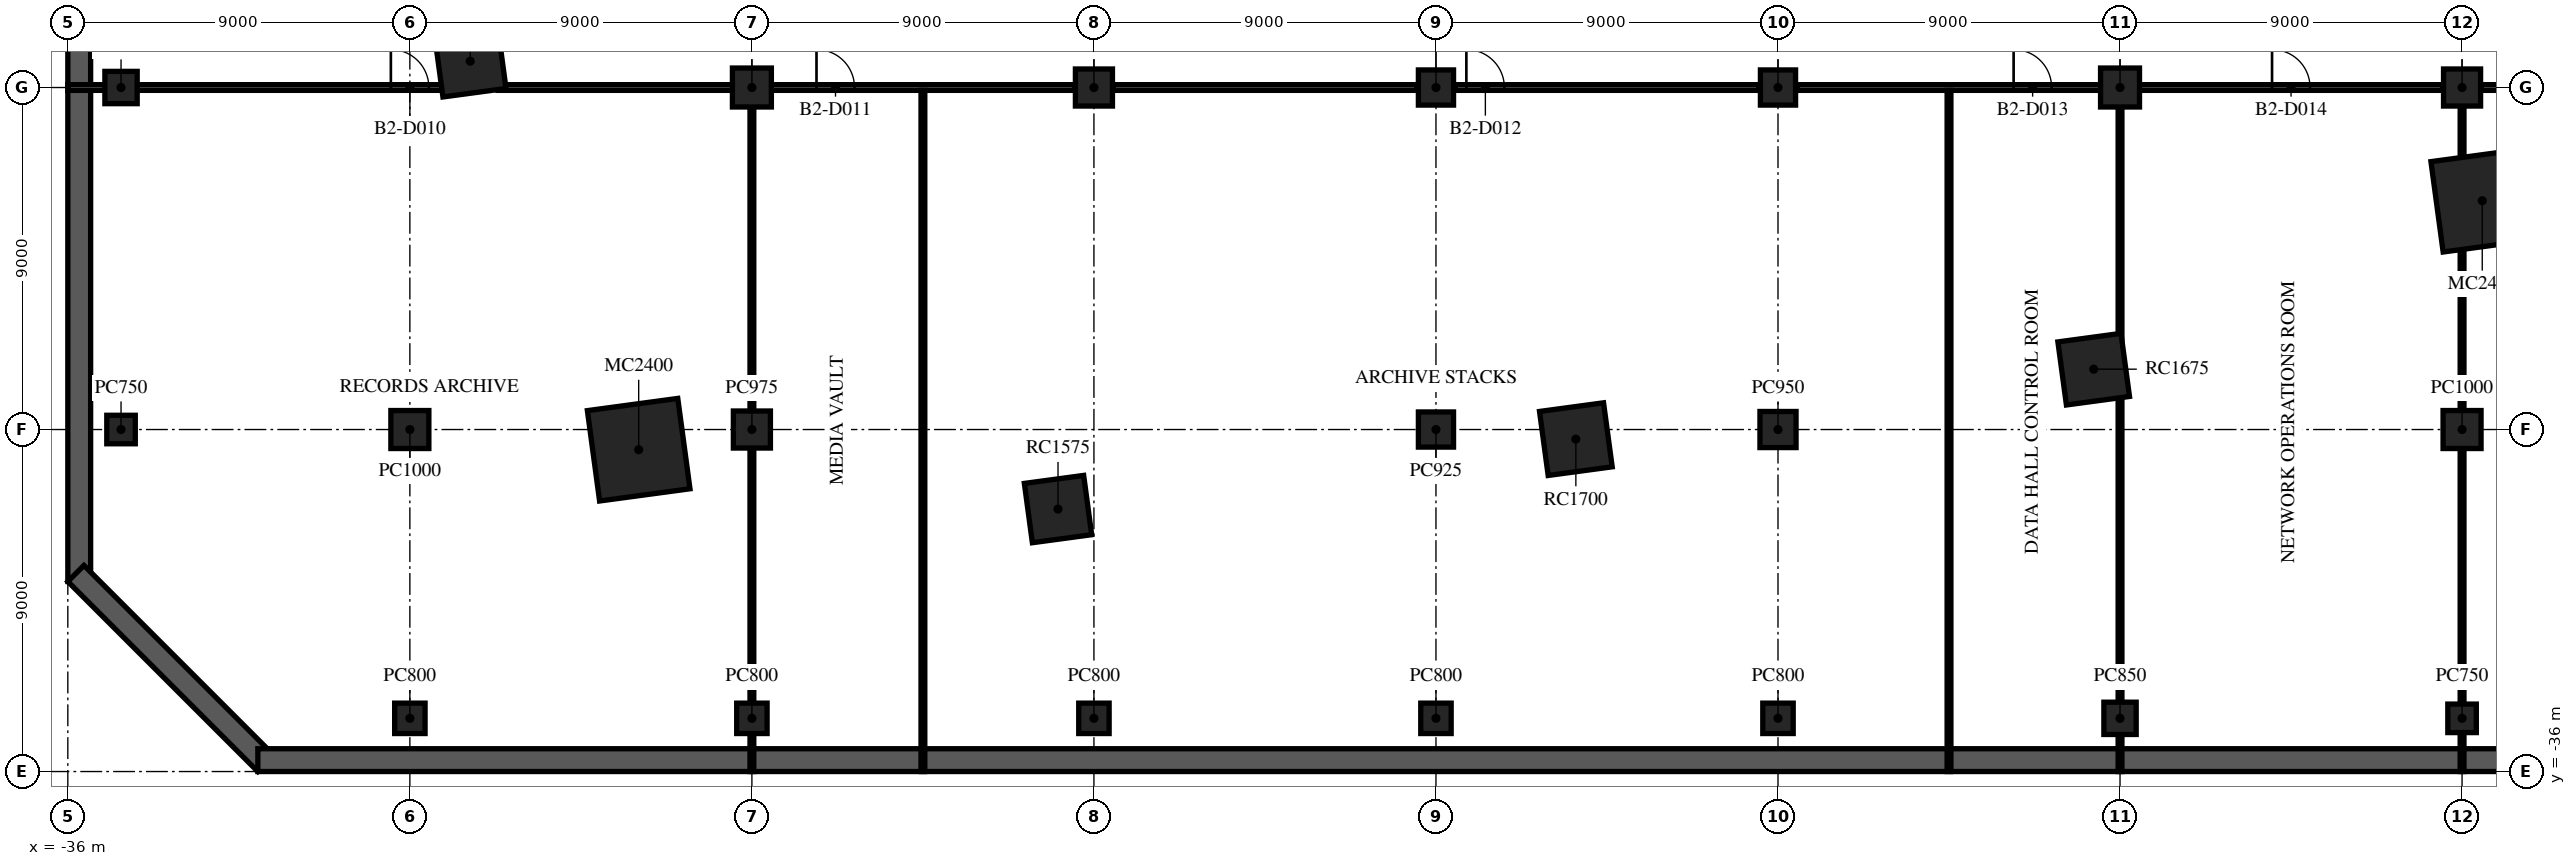
"""IFC4 building model, lengths in metres.
Left out: names, types, materials, properties, quantities, classifications, styles, units other than length and angle.
Written with IfcOpenShell. Run it as: python <this file> out.ifc"""

import sys

from ifc_helpers import new_model, si_unit, direction, frame, frame_2d, origin, origin_2d, place, context, subcontext, project, spatial, rectangle, extrude, element, fill, save


model = new_model("IFC4")
c1 = context("Model", 3, precision=1e-05, world=origin(), true_north=direction((0.0, 1.0)))
c2 = subcontext(c1, "Body", "Model", "MODEL_VIEW")
j1 = project(units=[si_unit("LENGTHUNIT", "METRE"), si_unit("PLANEANGLEUNIT", "RADIAN")], contexts=[c1])
p1 = place(None, origin())
s1 = spatial("IfcSite", under=j1, at=p1, CompositionType="ELEMENT")
p2 = place(p1, origin())
s2 = spatial("IfcBuilding", under=s1, at=p2, CompositionType="ELEMENT")
p3 = place(p2, frame((0.0, 0.0, -9.0)))
s3 = spatial("IfcBuildingStorey", under=s2, at=p3, CompositionType="ELEMENT", Elevation=-9.0)
p4 = place(p3, frame((-35.7, 31.0, -0.3), z_axis=(0.0, 0.0, 1.0), x_axis=(0.0, -1.0, 0.0)))
e1 = element("IfcWall", 1, at=p4, inside=s3, PredefinedType="SOLIDWALL", context=c2, shape_type="SweptSolid", body=[
    extrude(rectangle(XDim=62.0, YDim=0.6, at=frame_2d((31.0, 0.0))), origin(), (0.0, 0.0, 1.0), 4.5),
])
p5 = place(p3, frame((-35.788, -30.788, -0.3), z_axis=(0.0, 0.0, 1.0), x_axis=(0.707106781187, -0.707106781187, 0.0)))
e2 = element("IfcWall", 2, at=p5, inside=s3, PredefinedType="SOLIDWALL", context=c2, shape_type="SweptSolid", body=[
    extrude(rectangle(XDim=7.071, YDim=0.6, at=frame_2d((3.536, 0.0))), origin(), (0.0, 0.0, 1.0), 4.5),
])
p6 = place(p3, frame((-31.0, -35.7, -0.3), z_axis=(0.0, 0.0, 1.0), x_axis=(1.0, 0.0, 0.0)))
e3 = element("IfcWall", 3, at=p6, inside=s3, PredefinedType="SOLIDWALL", context=c2, shape_type="SweptSolid", body=[
    extrude(rectangle(XDim=62.0, YDim=0.6, at=frame_2d((31.0, 0.0))), origin(), (0.0, 0.0, 1.0), 4.5),
])
p7 = place(p3, frame((-34.6, -27.0, -0.3), z_axis=(0.0, 0.0, 1.0), x_axis=(1.0, 0.0, 0.0)))
e4 = element("IfcColumn", 4, at=p7, inside=s3, PredefinedType="COLUMN", context=c2, shape_type="SweptSolid", body=[
    extrude(rectangle(XDim=0.75, YDim=0.75, at=origin_2d()), origin(), (0.0, 0.0, 1.0), 4.8),
])
p8 = place(p3, frame((-34.6, -18.0, -0.3), z_axis=(0.0, 0.0, 1.0), x_axis=(1.0, 0.0, 0.0)))
e5 = element("IfcColumn", 5, at=p8, inside=s3, PredefinedType="COLUMN", context=c2, shape_type="SweptSolid", body=[
    extrude(rectangle(XDim=0.85, YDim=0.85, at=origin_2d()), origin(), (0.0, 0.0, 1.0), 4.8),
])
p9 = place(p3, frame((-27.0, -34.6, -0.3), z_axis=(0.0, 0.0, 1.0), x_axis=(1.0, 0.0, 0.0)))
e6 = element("IfcColumn", 6, at=p9, inside=s3, PredefinedType="COLUMN", context=c2, shape_type="SweptSolid", body=[
    extrude(rectangle(XDim=0.8, YDim=0.8, at=origin_2d()), origin(), (0.0, 0.0, 1.0), 4.8),
])
p10 = place(p3, frame((-27.0, -27.0, -0.3), z_axis=(0.0, 0.0, 1.0), x_axis=(1.0, 0.0, 0.0)))
e7 = element("IfcColumn", 7, at=p10, inside=s3, PredefinedType="COLUMN", context=c2, shape_type="SweptSolid", body=[
    extrude(rectangle(XDim=1.0, YDim=1.0, at=origin_2d()), origin(), (0.0, 0.0, 1.0), 4.8),
])
p11 = place(p3, frame((-18.0, -34.6, -0.3), z_axis=(0.0, 0.0, 1.0), x_axis=(1.0, 0.0, 0.0)))
e8 = element("IfcColumn", 8, at=p11, inside=s3, PredefinedType="COLUMN", context=c2, shape_type="SweptSolid", body=[
    extrude(rectangle(XDim=0.8, YDim=0.8, at=origin_2d()), origin(), (0.0, 0.0, 1.0), 4.8),
])
p12 = place(p3, frame((-18.0, -27.0, -0.3), z_axis=(0.0, 0.0, 1.0), x_axis=(1.0, 0.0, 0.0)))
e9 = element("IfcColumn", 9, at=p12, inside=s3, PredefinedType="COLUMN", context=c2, shape_type="SweptSolid", body=[
    extrude(rectangle(XDim=0.975, YDim=0.975, at=origin_2d()), origin(), (0.0, 0.0, 1.0), 4.8),
])
p13 = place(p3, frame((-18.0, -18.0, -0.3), z_axis=(0.0, 0.0, 1.0), x_axis=(1.0, 0.0, 0.0)))
e10 = element("IfcColumn", 10, at=p13, inside=s3, PredefinedType="COLUMN", context=c2, shape_type="SweptSolid", body=[
    extrude(rectangle(XDim=1.025, YDim=1.025, at=origin_2d()), origin(), (0.0, 0.0, 1.0), 4.8),
])
p14 = place(p3, frame((-9.0, -34.6, -0.3), z_axis=(0.0, 0.0, 1.0), x_axis=(1.0, 0.0, 0.0)))
e11 = element("IfcColumn", 11, at=p14, inside=s3, PredefinedType="COLUMN", context=c2, shape_type="SweptSolid", body=[
    extrude(rectangle(XDim=0.8, YDim=0.8, at=origin_2d()), origin(), (0.0, 0.0, 1.0), 4.8),
])
p15 = place(p3, frame((-9.0, -18.0, -0.3), z_axis=(0.0, 0.0, 1.0), x_axis=(1.0, 0.0, 0.0)))
e12 = element("IfcColumn", 12, at=p15, inside=s3, PredefinedType="COLUMN", context=c2, shape_type="SweptSolid", body=[
    extrude(rectangle(XDim=0.975, YDim=0.975, at=origin_2d()), origin(), (0.0, 0.0, 1.0), 4.8),
])
p16 = place(p3, frame((0.0, -34.6, -0.3), z_axis=(0.0, 0.0, 1.0), x_axis=(1.0, 0.0, 0.0)))
e13 = element("IfcColumn", 13, at=p16, inside=s3, PredefinedType="COLUMN", context=c2, shape_type="SweptSolid", body=[
    extrude(rectangle(XDim=0.8, YDim=0.8, at=origin_2d()), origin(), (0.0, 0.0, 1.0), 4.8),
])
for number, where, z_axis, x_axis in (
    (14, (0.0, -27.0, -0.3), (0.0, 0.0, 1.0), (1.0, 0.0, 0.0)),
    (15, (0.0, -18.0, -0.3), (0.0, 0.0, 1.0), (1.0, 0.0, 0.0)),
):
    element("IfcColumn", number, at=place(p3, frame(where, z_axis=z_axis, x_axis=x_axis)), inside=s3, PredefinedType="COLUMN", context=c2, shape_type="SweptSolid", body=[
        extrude(rectangle(XDim=0.925, YDim=0.925, at=origin_2d()), origin(), (0.0, 0.0, 1.0), 4.8),
    ])
p17 = place(p3, frame((9.0, -34.6, -0.3), z_axis=(0.0, 0.0, 1.0), x_axis=(1.0, 0.0, 0.0)))
e16 = element("IfcColumn", 16, at=p17, inside=s3, PredefinedType="COLUMN", context=c2, shape_type="SweptSolid", body=[
    extrude(rectangle(XDim=0.8, YDim=0.8, at=origin_2d()), origin(), (0.0, 0.0, 1.0), 4.8),
])
p18 = place(p3, frame((9.0, -27.0, -0.3), z_axis=(0.0, 0.0, 1.0), x_axis=(1.0, 0.0, 0.0)))
e17 = element("IfcColumn", 17, at=p18, inside=s3, PredefinedType="COLUMN", context=c2, shape_type="SweptSolid", body=[
    extrude(rectangle(XDim=0.95, YDim=0.95, at=origin_2d()), origin(), (0.0, 0.0, 1.0), 4.8),
])
p19 = place(p3, frame((9.0, -18.0, -0.3), z_axis=(0.0, 0.0, 1.0), x_axis=(1.0, 0.0, 0.0)))
e18 = element("IfcColumn", 18, at=p19, inside=s3, PredefinedType="COLUMN", context=c2, shape_type="SweptSolid", body=[
    extrude(rectangle(XDim=0.925, YDim=0.925, at=origin_2d()), origin(), (0.0, 0.0, 1.0), 4.8),
])
p20 = place(p3, frame((18.0, -34.6, -0.3), z_axis=(0.0, 0.0, 1.0), x_axis=(1.0, 0.0, 0.0)))
e19 = element("IfcColumn", 19, at=p20, inside=s3, PredefinedType="COLUMN", context=c2, shape_type="SweptSolid", body=[
    extrude(rectangle(XDim=0.85, YDim=0.85, at=origin_2d()), origin(), (0.0, 0.0, 1.0), 4.8),
])
p21 = place(p3, frame((18.0, -18.0, -0.3), z_axis=(0.0, 0.0, 1.0), x_axis=(1.0, 0.0, 0.0)))
e20 = element("IfcColumn", 20, at=p21, inside=s3, PredefinedType="COLUMN", context=c2, shape_type="SweptSolid", body=[
    extrude(rectangle(XDim=1.025, YDim=1.025, at=origin_2d()), origin(), (0.0, 0.0, 1.0), 4.8),
])
p22 = place(p3, frame((27.0, -34.6, -0.3), z_axis=(0.0, 0.0, 1.0), x_axis=(1.0, 0.0, 0.0)))
e21 = element("IfcColumn", 21, at=p22, inside=s3, PredefinedType="COLUMN", context=c2, shape_type="SweptSolid", body=[
    extrude(rectangle(XDim=0.75, YDim=0.75, at=origin_2d()), origin(), (0.0, 0.0, 1.0), 4.8),
])
p23 = place(p3, frame((27.0, -27.0, -0.3), z_axis=(0.0, 0.0, 1.0), x_axis=(1.0, 0.0, 0.0)))
e22 = element("IfcColumn", 22, at=p23, inside=s3, PredefinedType="COLUMN", context=c2, shape_type="SweptSolid", body=[
    extrude(rectangle(XDim=1.0, YDim=1.0, at=origin_2d()), origin(), (0.0, 0.0, 1.0), 4.8),
])
p24 = place(p3, frame((27.0, -18.0, -0.3), z_axis=(0.0, 0.0, 1.0), x_axis=(1.0, 0.0, 0.0)))
e23 = element("IfcColumn", 23, at=p24, inside=s3, PredefinedType="COLUMN", context=c2, shape_type="SweptSolid", body=[
    extrude(rectangle(XDim=0.975, YDim=0.975, at=origin_2d()), origin(), (0.0, 0.0, 1.0), 4.8),
])
p25 = place(p3, frame((-25.412, -17.307, -0.3), z_axis=(0.0, 0.0, 1.0), x_axis=(0.991001197216, 0.133853005627, 0.0)))
e24 = element("IfcColumn", 24, at=p25, inside=s3, PredefinedType="COLUMN", context=c2, shape_type="SweptSolid", body=[
    extrude(rectangle(XDim=1.675, YDim=1.675, at=origin_2d()), origin(), (0.0, 0.0, 1.0), 4.8),
])
p26 = place(p3, frame((-20.979, -27.531, -0.3), z_axis=(0.0, 0.0, 1.0), x_axis=(0.991001197216, 0.133853005627, 0.0)))
e25 = element("IfcColumn", 25, at=p26, inside=s3, PredefinedType="COLUMN", context=c2, shape_type="SweptSolid", body=[
    extrude(rectangle(XDim=2.4, YDim=2.4, at=origin_2d()), origin(), (0.0, 0.0, 1.0), 4.8),
])
p27 = place(p3, frame((-9.945, -29.093, -0.3), z_axis=(0.0, 0.0, 1.0), x_axis=(0.991001197216, 0.133853005627, 0.0)))
e26 = element("IfcColumn", 26, at=p27, inside=s3, PredefinedType="COLUMN", context=c2, shape_type="SweptSolid", body=[
    extrude(rectangle(XDim=1.575, YDim=1.575, at=origin_2d()), origin(), (0.0, 0.0, 1.0), 4.8),
])
p28 = place(p3, frame((3.681, -27.253, -0.3), z_axis=(0.0, 0.0, 1.0), x_axis=(0.991001197216, 0.133853005627, 0.0)))
e27 = element("IfcColumn", 27, at=p28, inside=s3, PredefinedType="COLUMN", context=c2, shape_type="SweptSolid", body=[
    extrude(rectangle(XDim=1.7, YDim=1.7, at=origin_2d()), origin(), (0.0, 0.0, 1.0), 4.8),
])
p29 = place(p3, frame((17.307, -25.412, -0.3), z_axis=(0.0, 0.0, 1.0), x_axis=(0.991001197216, 0.133853005627, 0.0)))
e28 = element("IfcColumn", 28, at=p29, inside=s3, PredefinedType="COLUMN", context=c2, shape_type="SweptSolid", body=[
    extrude(rectangle(XDim=1.675, YDim=1.675, at=origin_2d()), origin(), (0.0, 0.0, 1.0), 4.8),
])
p30 = place(p3, frame((27.531, -20.979, -0.3), z_axis=(0.0, 0.0, 1.0), x_axis=(0.991001197216, 0.133853005627, 0.0)))
e29 = element("IfcColumn", 29, at=p30, inside=s3, PredefinedType="COLUMN", context=c2, shape_type="SweptSolid", body=[
    extrude(rectangle(XDim=2.4, YDim=2.4, at=origin_2d()), origin(), (0.0, 0.0, 1.0), 4.8),
])
p31 = place(p3, frame((-36.0, -18.0, 0.0), z_axis=(0.0, 0.0, 1.0), x_axis=(1.0, 0.0, 0.0)))
e30 = element("IfcWall", 30, at=p31, inside=s3, PredefinedType="PARTITIONING", context=c2, shape_type="SweptSolid", body=[
    extrude(rectangle(XDim=9.857, YDim=0.15, at=frame_2d((4.928, 0.0))), origin(), (0.0, 0.0, 1.0), 4.2),
])
p32 = place(p31, frame((8.5, 0.0, 0.0)))
e31 = element("IfcOpeningElement", 31, at=p32, cuts=e30, PredefinedType="OPENING", context=c2, shape_type="SweptSolid", body=[
    extrude(rectangle(XDim=1.0, YDim=2.1, at=frame_2d((0.5, 1.05))), frame((0.0, 0.085, 0.0), z_axis=(0.0, -1.0, 0.0), x_axis=(1.0, 0.0, 0.0)), (0.0, 0.0, 1.0), 0.17),
])
p33 = place(p3, frame((-24.681, -18.0, 0.0), z_axis=(0.0, 0.0, 1.0), x_axis=(1.0, 0.0, 0.0)))
e32 = element("IfcWall", 32, at=p33, inside=s3, PredefinedType="PARTITIONING", context=c2, shape_type="SweptSolid", body=[
    extrude(rectangle(XDim=6.181, YDim=0.15, at=frame_2d((3.09, 0.0))), origin(), (0.0, 0.0, 1.0), 4.2),
])
p34 = place(p3, frame((-17.5, -18.0, 0.0), z_axis=(0.0, 0.0, 1.0), x_axis=(1.0, 0.0, 0.0)))
e33 = element("IfcWall", 33, at=p34, inside=s3, PredefinedType="PARTITIONING", context=c2, shape_type="SweptSolid", body=[
    extrude(rectangle(XDim=8.0, YDim=0.15, at=frame_2d((4.0, 0.0))), origin(), (0.0, 0.0, 1.0), 4.2),
])
p35 = place(p34, frame((1.2, 0.0, 0.0)))
e34 = element("IfcOpeningElement", 34, at=p35, cuts=e33, PredefinedType="OPENING", context=c2, shape_type="SweptSolid", body=[
    extrude(rectangle(XDim=1.0, YDim=2.1, at=frame_2d((0.5, 1.05))), frame((0.0, 0.085, 0.0), z_axis=(0.0, -1.0, 0.0), x_axis=(1.0, 0.0, 0.0)), (0.0, 0.0, 1.0), 0.17),
])
p36 = place(p3, frame((-8.5, -18.0, 0.0), z_axis=(0.0, 0.0, 1.0), x_axis=(1.0, 0.0, 0.0)))
e35 = element("IfcWall", 35, at=p36, inside=s3, PredefinedType="PARTITIONING", context=c2, shape_type="SweptSolid", body=[
    extrude(rectangle(XDim=8.0, YDim=0.15, at=frame_2d((4.0, 0.0))), origin(), (0.0, 0.0, 1.0), 4.2),
])
p37 = place(p3, frame((0.5, -18.0, 0.0), z_axis=(0.0, 0.0, 1.0), x_axis=(1.0, 0.0, 0.0)))
e36 = element("IfcWall", 36, at=p37, inside=s3, PredefinedType="PARTITIONING", context=c2, shape_type="SweptSolid", body=[
    extrude(rectangle(XDim=8.0, YDim=0.15, at=frame_2d((4.0, 0.0))), origin(), (0.0, 0.0, 1.0), 4.2),
])
p38 = place(p37, frame((0.3, 0.0, 0.0)))
e37 = element("IfcOpeningElement", 37, at=p38, cuts=e36, PredefinedType="OPENING", context=c2, shape_type="SweptSolid", body=[
    extrude(rectangle(XDim=1.0, YDim=2.1, at=frame_2d((0.5, 1.05))), frame((0.0, 0.085, 0.0), z_axis=(0.0, -1.0, 0.0), x_axis=(1.0, 0.0, 0.0)), (0.0, 0.0, 1.0), 0.17),
])
p39 = place(p3, frame((9.5, -18.0, 0.0), z_axis=(0.0, 0.0, 1.0), x_axis=(1.0, 0.0, 0.0)))
e38 = element("IfcWall", 38, at=p39, inside=s3, PredefinedType="PARTITIONING", context=c2, shape_type="SweptSolid", body=[
    extrude(rectangle(XDim=8.0, YDim=0.15, at=frame_2d((4.0, 0.0))), origin(), (0.0, 0.0, 1.0), 4.2),
])
p40 = place(p39, frame((5.7, 0.0, 0.0)))
e39 = element("IfcOpeningElement", 39, at=p40, cuts=e38, PredefinedType="OPENING", context=c2, shape_type="SweptSolid", body=[
    extrude(rectangle(XDim=1.0, YDim=2.1, at=frame_2d((0.5, 1.05))), frame((0.0, 0.085, 0.0), z_axis=(0.0, -1.0, 0.0), x_axis=(1.0, 0.0, 0.0)), (0.0, 0.0, 1.0), 0.17),
])
p41 = place(p3, frame((18.5, -18.0, 0.0), z_axis=(0.0, 0.0, 1.0), x_axis=(1.0, 0.0, 0.0)))
e40 = element("IfcWall", 40, at=p41, inside=s3, PredefinedType="PARTITIONING", context=c2, shape_type="SweptSolid", body=[
    extrude(rectangle(XDim=8.0, YDim=0.15, at=frame_2d((4.0, 0.0))), origin(), (0.0, 0.0, 1.0), 4.2),
])
p42 = place(p41, frame((3.5, 0.0, 0.0)))
e41 = element("IfcOpeningElement", 41, at=p42, cuts=e40, PredefinedType="OPENING", context=c2, shape_type="SweptSolid", body=[
    extrude(rectangle(XDim=1.0, YDim=2.1, at=frame_2d((0.5, 1.05))), frame((0.0, 0.085, 0.0), z_axis=(0.0, -1.0, 0.0), x_axis=(1.0, 0.0, 0.0)), (0.0, 0.0, 1.0), 0.17),
])
p43 = place(p3, frame((27.5, -18.0, 0.0), z_axis=(0.0, 0.0, 1.0), x_axis=(1.0, 0.0, 0.0)))
e42 = element("IfcWall", 42, at=p43, inside=s3, PredefinedType="PARTITIONING", context=c2, shape_type="SweptSolid", body=[
    extrude(rectangle(XDim=8.5, YDim=0.15, at=frame_2d((4.25, 0.0))), origin(), (0.0, 0.0, 1.0), 4.2),
])
p44 = place(p43, frame((3.5, 0.0, 0.0)))
e43 = element("IfcOpeningElement", 43, at=p44, cuts=e42, PredefinedType="OPENING", context=c2, shape_type="SweptSolid", body=[
    extrude(rectangle(XDim=1.0, YDim=2.1, at=frame_2d((0.5, 1.05))), frame((0.0, 0.085, 0.0), z_axis=(0.0, -1.0, 0.0), x_axis=(1.0, 0.0, 0.0)), (0.0, 0.0, 1.0), 0.17),
])
p45 = place(p3, frame((-18.0, -36.0, 0.0), z_axis=(0.0, 0.0, 1.0), x_axis=(0.0, 1.0, 0.0)))
e44 = element("IfcWall", 44, at=p45, inside=s3, PredefinedType="PARTITIONING", context=c2, shape_type="SweptSolid", body=[
    extrude(rectangle(XDim=8.5, YDim=0.1, at=frame_2d((4.25, 0.0))), origin(), (0.0, 0.0, 1.0), 4.2),
])
p46 = place(p3, frame((-18.0, -26.5, 0.0), z_axis=(0.0, 0.0, 1.0), x_axis=(0.0, 1.0, 0.0)))
e45 = element("IfcWall", 45, at=p46, inside=s3, PredefinedType="PARTITIONING", context=c2, shape_type="SweptSolid", body=[
    extrude(rectangle(XDim=8.0, YDim=0.1, at=frame_2d((4.0, 0.0))), origin(), (0.0, 0.0, 1.0), 4.2),
])
for number, where, z_axis, x_axis in (
    (46, (-13.5, -36.0, 0.0), (0.0, 0.0, 1.0), (0.0, 1.0, 0.0)),
    (47, (13.5, -36.0, 0.0), (0.0, 0.0, 1.0), (0.0, 1.0, 0.0)),
):
    element("IfcWall", number, at=place(p3, frame(where, z_axis=z_axis, x_axis=x_axis)), inside=s3, PredefinedType="PARTITIONING", context=c2, shape_type="SweptSolid", body=[
        extrude(rectangle(XDim=17.925, YDim=0.1, at=frame_2d((8.962, 0.0))), origin(), (0.0, 0.0, 1.0), 4.2),
    ])
p47 = place(p3, frame((18.0, -36.0, 0.0), z_axis=(0.0, 0.0, 1.0), x_axis=(0.0, 1.0, 0.0)))
e48 = element("IfcWall", 48, at=p47, inside=s3, PredefinedType="PARTITIONING", context=c2, shape_type="SweptSolid", body=[
    extrude(rectangle(XDim=9.857, YDim=0.1, at=frame_2d((4.928, 0.0))), origin(), (0.0, 0.0, 1.0), 4.2),
])
p48 = place(p3, frame((18.0, -24.681, 0.0), z_axis=(0.0, 0.0, 1.0), x_axis=(0.0, 1.0, 0.0)))
e49 = element("IfcWall", 49, at=p48, inside=s3, PredefinedType="PARTITIONING", context=c2, shape_type="SweptSolid", body=[
    extrude(rectangle(XDim=6.181, YDim=0.1, at=frame_2d((3.09, 0.0))), origin(), (0.0, 0.0, 1.0), 4.2),
])
p49 = place(p3, frame((27.0, -36.0, 0.0), z_axis=(0.0, 0.0, 1.0), x_axis=(0.0, 1.0, 0.0)))
e50 = element("IfcWall", 50, at=p49, inside=s3, PredefinedType="PARTITIONING", context=c2, shape_type="SweptSolid", body=[
    extrude(rectangle(XDim=8.5, YDim=0.1, at=frame_2d((4.25, 0.0))), origin(), (0.0, 0.0, 1.0), 4.2),
])
p50 = place(p3, frame((27.0, -26.5, 0.0), z_axis=(0.0, 0.0, 1.0), x_axis=(0.0, 1.0, 0.0)))
e51 = element("IfcWall", 51, at=p50, inside=s3, PredefinedType="PARTITIONING", context=c2, shape_type="SweptSolid", body=[
    extrude(rectangle(XDim=4.284, YDim=0.1, at=frame_2d((2.142, 0.0))), origin(), (0.0, 0.0, 1.0), 4.2),
])
p51 = place(p3, frame((27.0, -19.742, 0.0), z_axis=(0.0, 0.0, 1.0), x_axis=(0.0, 1.0, 0.0)))
e52 = element("IfcWall", 52, at=p51, inside=s3, PredefinedType="PARTITIONING", context=c2, shape_type="SweptSolid", body=[
    extrude(rectangle(XDim=1.242, YDim=0.1, at=frame_2d((0.621, 0.0))), origin(), (0.0, 0.0, 1.0), 4.2),
])
p52 = place(p32, origin())
e53 = element("IfcDoor", 53, at=p52, inside=s3, OperationType="SINGLE_SWING_RIGHT", PredefinedType="DOOR", context=c2, shape_type="SweptSolid", body=[
    extrude(rectangle(XDim=1.0, YDim=2.1, at=frame_2d((0.5, 1.05))), frame((0.0, 0.025, 0.0), z_axis=(0.0, -1.0, 0.0), x_axis=(1.0, 0.0, 0.0)), (0.0, 0.0, 1.0), 0.05),
])
fill(e31, e53)
p53 = place(p35, origin())
e54 = element("IfcDoor", 54, at=p53, inside=s3, OperationType="SINGLE_SWING_LEFT", PredefinedType="DOOR", context=c2, shape_type="SweptSolid", body=[
    extrude(rectangle(XDim=1.0, YDim=2.1, at=frame_2d((0.5, 1.05))), frame((0.0, 0.025, 0.0), z_axis=(0.0, -1.0, 0.0), x_axis=(1.0, 0.0, 0.0)), (0.0, 0.0, 1.0), 0.05),
])
fill(e34, e54)
p54 = place(p38, origin())
e55 = element("IfcDoor", 55, at=p54, inside=s3, OperationType="SINGLE_SWING_RIGHT", PredefinedType="DOOR", context=c2, shape_type="SweptSolid", body=[
    extrude(rectangle(XDim=1.0, YDim=2.1, at=frame_2d((0.5, 1.05))), frame((0.0, 0.025, 0.0), z_axis=(0.0, -1.0, 0.0), x_axis=(1.0, 0.0, 0.0)), (0.0, 0.0, 1.0), 0.05),
])
fill(e37, e55)
p55 = place(p40, origin())
e56 = element("IfcDoor", 56, at=p55, inside=s3, OperationType="SINGLE_SWING_LEFT", PredefinedType="DOOR", context=c2, shape_type="SweptSolid", body=[
    extrude(rectangle(XDim=1.0, YDim=2.1, at=frame_2d((0.5, 1.05))), frame((0.0, 0.025, 0.0), z_axis=(0.0, -1.0, 0.0), x_axis=(1.0, 0.0, 0.0)), (0.0, 0.0, 1.0), 0.05),
])
fill(e39, e56)
p56 = place(p42, origin())
e57 = element("IfcDoor", 57, at=p56, inside=s3, OperationType="SINGLE_SWING_RIGHT", PredefinedType="DOOR", context=c2, shape_type="SweptSolid", body=[
    extrude(rectangle(XDim=1.0, YDim=2.1, at=frame_2d((0.5, 1.05))), frame((0.0, 0.025, 0.0), z_axis=(0.0, -1.0, 0.0), x_axis=(1.0, 0.0, 0.0)), (0.0, 0.0, 1.0), 0.05),
])
fill(e41, e57)
save(model, sys.argv[1])
